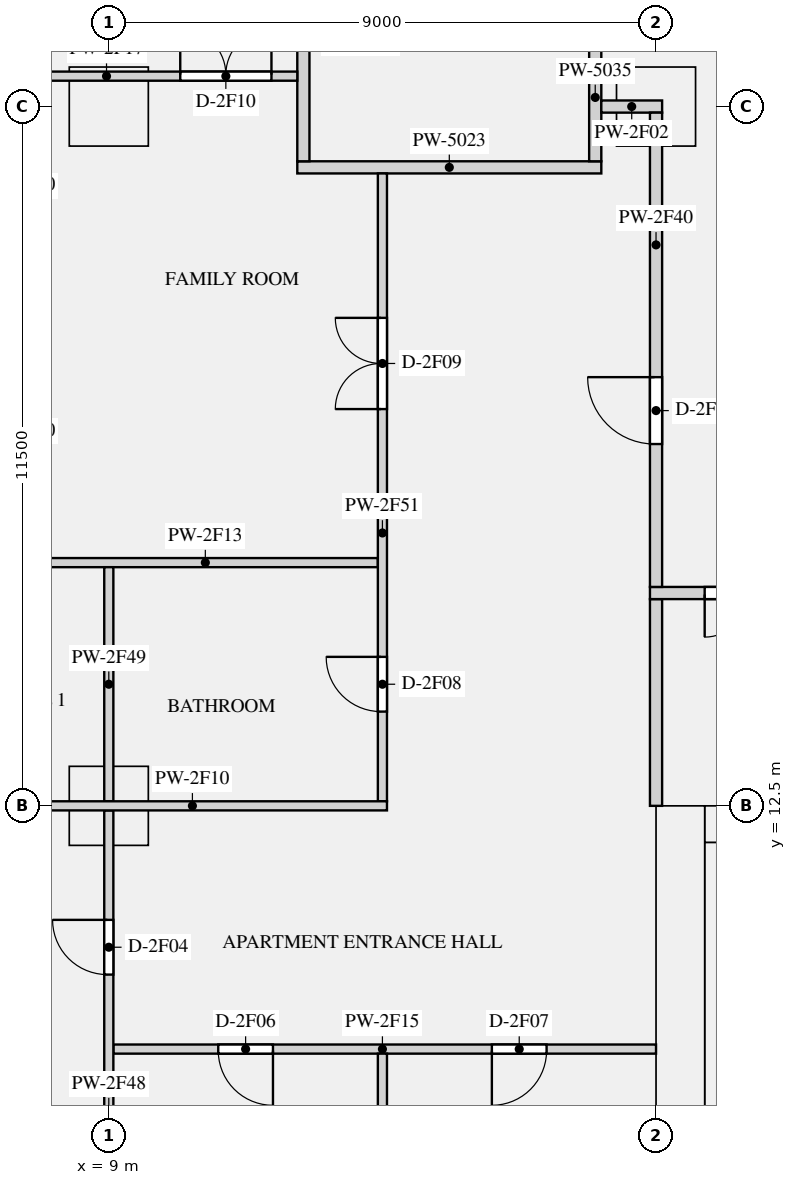
"""IFC4 building model, lengths in metres.
Left out: names, types, materials, properties, quantities, classifications, styles, units other than length and angle.
Written with IfcOpenShell. Run it as: python <this file> out.ifc"""

import sys

from ifc_helpers import new_model, si_unit, direction, frame, frame_2d, origin, origin_2d, place, context, subcontext, project, spatial, rectangle, extrude, element, fill, save


model = new_model("IFC4")
c1 = context("Model", 3, precision=1e-05, world=origin(), true_north=direction((0.0, 1.0)))
c2 = subcontext(c1, "Body", "Model", "MODEL_VIEW")
j1 = project(units=[si_unit("LENGTHUNIT", "METRE"), si_unit("PLANEANGLEUNIT", "RADIAN")], contexts=[c1])
p1 = place(None, origin())
s1 = spatial("IfcSite", under=j1, at=p1, CompositionType="ELEMENT")
p2 = place(p1, origin())
s2 = spatial("IfcBuilding", under=s1, at=p2, CompositionType="ELEMENT")
p3 = place(p2, frame((0.0, 0.0, 127.65)))
s3 = spatial("IfcBuildingStorey", under=s2, at=p3, CompositionType="ELEMENT", Elevation=127.65)
for number, where, z_axis, x_axis in (
    (1, (9.0, 24.0, 0.0), (0.0, 0.0, 1.0), (1.0, 0.0, 0.0)),
    (2, (18.0, 24.0, 0.0), (0.0, 0.0, 1.0), (1.0, 0.0, 0.0)),
    (3, (9.0, 12.5, 0.0), (0.0, 0.0, 1.0), (1.0, 0.0, 0.0)),
):
    element("IfcColumn", number, at=place(p3, frame(where, z_axis=z_axis, x_axis=x_axis)), inside=s3, PredefinedType="COLUMN", context=c2, shape_type="SweptSolid", body=[
        extrude(rectangle(XDim=1.3, YDim=1.3, at=origin_2d()), origin(), (0.0, 0.0, 1.0), 3.15),
    ])
p4 = place(p3, frame((18.4, 0.0, 0.0), z_axis=(0.0, 0.0, 1.0), x_axis=(0.0, 1.0, 0.0)))
e4 = element("IfcWall", 4, at=p4, inside=s3, PredefinedType="SHEAR", context=c2, shape_type="SweptSolid", body=[
    extrude(rectangle(XDim=12.5, YDim=0.8, at=frame_2d((6.25, 0.0))), origin(), (0.0, 0.0, 1.0), 3.15),
])
p5 = place(p3, frame((18.8, 12.2, 0.0), z_axis=(0.0, 0.0, 1.0), x_axis=(1.0, 0.0, 0.0)))
e5 = element("IfcWall", 5, at=p5, inside=s3, PredefinedType="SHEAR", context=c2, shape_type="SweptSolid", body=[
    extrude(rectangle(XDim=34.4, YDim=0.6, at=frame_2d((17.2, 0.0))), origin(), (0.0, 0.0, 1.0), 3.15),
])
p6 = place(p5, frame((24.375, 0.0, 0.0)))
e6 = element("IfcOpeningElement", 6, at=p6, cuts=e5, PredefinedType="OPENING", context=c2, shape_type="SweptSolid", body=[
    extrude(rectangle(XDim=1.1, YDim=2.1, at=frame_2d((0.55, 1.05))), frame((0.0, 0.31, 0.0), z_axis=(0.0, -1.0, 0.0), x_axis=(1.0, 0.0, 0.0)), (0.0, 0.0, 1.0), 0.62),
])
p7 = place(p5, frame((26.625, 0.0, 0.0)))
e7 = element("IfcOpeningElement", 7, at=p7, cuts=e5, PredefinedType="OPENING", context=c2, shape_type="SweptSolid", body=[
    extrude(rectangle(XDim=1.1, YDim=2.1, at=frame_2d((0.55, 1.05))), frame((0.0, 0.31, 0.0), z_axis=(0.0, -1.0, 0.0), x_axis=(1.0, 0.0, 0.0)), (0.0, 0.0, 1.0), 0.62),
])
p8 = place(p5, frame((28.875, 0.0, 0.0)))
e8 = element("IfcOpeningElement", 8, at=p8, cuts=e5, PredefinedType="OPENING", context=c2, shape_type="SweptSolid", body=[
    extrude(rectangle(XDim=1.1, YDim=2.1, at=frame_2d((0.55, 1.05))), frame((0.0, 0.31, 0.0), z_axis=(0.0, -1.0, 0.0), x_axis=(1.0, 0.0, 0.0)), (0.0, 0.0, 1.0), 0.62),
])
p9 = place(p5, frame((4.75, 0.0, 0.0)))
e9 = element("IfcOpeningElement", 9, at=p9, cuts=e5, PredefinedType="OPENING", context=c2, shape_type="SweptSolid", body=[
    extrude(rectangle(XDim=0.9, YDim=2.1, at=frame_2d((0.45, 1.05))), frame((0.0, 0.31, 0.0), z_axis=(0.0, -1.0, 0.0), x_axis=(1.0, 0.0, 0.0)), (0.0, 0.0, 1.0), 0.62),
])
p10 = place(p5, frame((11.75, 0.0, 0.0)))
e10 = element("IfcOpeningElement", 10, at=p10, cuts=e5, PredefinedType="OPENING", context=c2, shape_type="SweptSolid", body=[
    extrude(rectangle(XDim=0.9, YDim=2.1, at=frame_2d((0.45, 1.05))), frame((0.0, 0.31, 0.0), z_axis=(0.0, -1.0, 0.0), x_axis=(1.0, 0.0, 0.0)), (0.0, 0.0, 1.0), 0.62),
])
p11 = place(p5, frame((18.25, 0.0, 0.0)))
e11 = element("IfcOpeningElement", 11, at=p11, cuts=e5, PredefinedType="OPENING", context=c2, shape_type="SweptSolid", body=[
    extrude(rectangle(XDim=0.9, YDim=2.1, at=frame_2d((0.45, 1.05))), frame((0.0, 0.31, 0.0), z_axis=(0.0, -1.0, 0.0), x_axis=(1.0, 0.0, 0.0)), (0.0, 0.0, 1.0), 0.62),
])
p12 = place(p5, frame((1.35, 0.0, 0.0)))
e12 = element("IfcOpeningElement", 12, at=p12, cuts=e5, PredefinedType="OPENING", context=c2, shape_type="SweptSolid", body=[
    extrude(rectangle(XDim=1.2, YDim=2.1, at=frame_2d((0.6, 1.05))), frame((0.0, 0.31, 0.0), z_axis=(0.0, -1.0, 0.0), x_axis=(1.0, 0.0, 0.0)), (0.0, 0.0, 1.0), 0.62),
])
p13 = place(p5, frame((31.85, 0.0, 0.0)))
e13 = element("IfcOpeningElement", 13, at=p13, cuts=e5, PredefinedType="OPENING", context=c2, shape_type="SweptSolid", body=[
    extrude(rectangle(XDim=1.2, YDim=2.1, at=frame_2d((0.6, 1.05))), frame((0.0, 0.31, 0.0), z_axis=(0.0, -1.0, 0.0), x_axis=(1.0, 0.0, 0.0)), (0.0, 0.0, 1.0), 0.62),
])
p14 = place(p3, frame((18.9, 1.0, 0.0), z_axis=(0.0, 0.0, 1.0), x_axis=(0.0, 1.0, 0.0)))
e14 = element("IfcWall", 14, at=p14, inside=s3, PredefinedType="SHEAR", context=c2, shape_type="SweptSolid", body=[
    extrude(rectangle(XDim=10.9, YDim=0.2, at=frame_2d((5.45, 0.0))), origin(), (0.0, 0.0, 1.0), 3.15),
])
p15 = place(p3, frame((12.1, 23.0, 0.0), z_axis=(0.0, 0.0, 1.0), x_axis=(1.0, 0.0, 0.0)))
e15 = element("IfcWall", 15, at=p15, inside=s3, PredefinedType="PARTITIONING", context=c2, shape_type="SweptSolid", body=[
    extrude(rectangle(XDim=5.0, YDim=0.2, at=frame_2d((2.5, 0.0))), origin(), (0.0, 0.0, 1.0), 2.65),
])
p16 = place(p3, frame((18.0, 12.5, 0.0), z_axis=(0.0, 0.0, 1.0), x_axis=(0.0, 1.0, 0.0)))
e16 = element("IfcWall", 16, at=p16, inside=s3, PredefinedType="PARTITIONING", context=c2, shape_type="SweptSolid", body=[
    extrude(rectangle(XDim=3.4, YDim=0.2, at=frame_2d((1.7, 0.0))), origin(), (0.0, 0.0, 1.0), 2.65),
])
p17 = place(p3, frame((12.2, 23.1, 0.0), z_axis=(0.0, 0.0, 1.0), x_axis=(0.0, 1.0, 0.0)))
e17 = element("IfcWall", 17, at=p17, inside=s3, PredefinedType="PARTITIONING", context=c2, shape_type="SweptSolid", body=[
    extrude(rectangle(XDim=3.9, YDim=0.2, at=frame_2d((1.95, 0.0))), origin(), (0.0, 0.0, 1.0), 2.65),
])
p18 = place(p3, frame((17.0, 23.1, 0.0), z_axis=(0.0, 0.0, 1.0), x_axis=(0.0, 1.0, 0.0)))
e18 = element("IfcWall", 18, at=p18, inside=s3, PredefinedType="PARTITIONING", context=c2, shape_type="SweptSolid", body=[
    extrude(rectangle(XDim=3.8, YDim=0.2, at=frame_2d((1.9, 0.0))), origin(), (0.0, 0.0, 1.0), 2.65),
])
p19 = place(p18, frame((2.1, 0.0, 0.0)))
e19 = element("IfcOpeningElement", 19, at=p19, cuts=e18, PredefinedType="OPENING", context=c2, shape_type="SweptSolid", body=[
    extrude(rectangle(XDim=1.2, YDim=2.1, at=frame_2d((0.6, 1.05))), frame((0.0, 0.11, 0.0), z_axis=(0.0, -1.0, 0.0), x_axis=(1.0, 0.0, 0.0)), (0.0, 0.0, 1.0), 0.22),
])
p20 = place(p3, frame((17.1, 24.0, 0.0), z_axis=(0.0, 0.0, 1.0), x_axis=(1.0, 0.0, 0.0)))
e20 = element("IfcWall", 20, at=p20, inside=s3, PredefinedType="PARTITIONING", context=c2, shape_type="SweptSolid", body=[
    extrude(rectangle(XDim=1.0, YDim=0.2, at=frame_2d((0.5, 0.0))), origin(), (0.0, 0.0, 1.0), 2.65),
])
p21 = place(p3, frame((5.25, 12.5, 0.0), z_axis=(0.0, 0.0, 1.0), x_axis=(1.0, 0.0, 0.0)))
e21 = element("IfcWall", 21, at=p21, inside=s3, PredefinedType="PARTITIONING", context=c2, shape_type="SweptSolid", body=[
    extrude(rectangle(XDim=8.325, YDim=0.15, at=frame_2d((4.163, 0.0))), origin(), (0.0, 0.0, 1.0), 2.65),
])
p22 = place(p21, frame((1.025, 0.0, 0.0)))
e22 = element("IfcOpeningElement", 22, at=p22, cuts=e21, PredefinedType="OPENING", context=c2, shape_type="SweptSolid", body=[
    extrude(rectangle(XDim=0.9, YDim=2.1, at=frame_2d((0.45, 1.05))), frame((0.0, 0.085, 0.0), z_axis=(0.0, -1.0, 0.0), x_axis=(1.0, 0.0, 0.0)), (0.0, 0.0, 1.0), 0.17),
])
p23 = place(p3, frame((7.75, 16.5, 0.0), z_axis=(0.0, 0.0, 1.0), x_axis=(1.0, 0.0, 0.0)))
e23 = element("IfcWall", 23, at=p23, inside=s3, PredefinedType="PARTITIONING", context=c2, shape_type="SweptSolid", body=[
    extrude(rectangle(XDim=5.675, YDim=0.15, at=frame_2d((2.837, 0.0))), origin(), (0.0, 0.0, 1.0), 2.65),
])
p24 = place(p3, frame((9.075, 8.5, 0.0), z_axis=(0.0, 0.0, 1.0), x_axis=(1.0, 0.0, 0.0)))
e24 = element("IfcWall", 24, at=p24, inside=s3, PredefinedType="PARTITIONING", context=c2, shape_type="SweptSolid", body=[
    extrude(rectangle(XDim=8.925, YDim=0.15, at=frame_2d((4.462, 0.0))), origin(), (0.0, 0.0, 1.0), 2.65),
])
p25 = place(p24, frame((1.725, 0.0, 0.0)))
e25 = element("IfcOpeningElement", 25, at=p25, cuts=e24, PredefinedType="OPENING", context=c2, shape_type="SweptSolid", body=[
    extrude(rectangle(XDim=0.9, YDim=2.1, at=frame_2d((0.45, 1.05))), frame((0.0, 0.085, 0.0), z_axis=(0.0, -1.0, 0.0), x_axis=(1.0, 0.0, 0.0)), (0.0, 0.0, 1.0), 0.17),
])
p26 = place(p24, frame((6.225, 0.0, 0.0)))
e26 = element("IfcOpeningElement", 26, at=p26, cuts=e24, PredefinedType="OPENING", context=c2, shape_type="SweptSolid", body=[
    extrude(rectangle(XDim=0.9, YDim=2.1, at=frame_2d((0.45, 1.05))), frame((0.0, 0.085, 0.0), z_axis=(0.0, -1.0, 0.0), x_axis=(1.0, 0.0, 0.0)), (0.0, 0.0, 1.0), 0.17),
])
p27 = place(p3, frame((7.75, 24.5, 0.0), z_axis=(0.0, 0.0, 1.0), x_axis=(1.0, 0.0, 0.0)))
e27 = element("IfcWall", 27, at=p27, inside=s3, PredefinedType="PARTITIONING", context=c2, shape_type="SweptSolid", body=[
    extrude(rectangle(XDim=4.35, YDim=0.15, at=frame_2d((2.175, 0.0))), origin(), (0.0, 0.0, 1.0), 2.65),
])
p28 = place(p27, frame((2.425, 0.0, 0.0)))
e28 = element("IfcOpeningElement", 28, at=p28, cuts=e27, PredefinedType="OPENING", context=c2, shape_type="SweptSolid", body=[
    extrude(rectangle(XDim=1.5, YDim=2.1, at=frame_2d((0.75, 1.05))), frame((0.0, 0.085, 0.0), z_axis=(0.0, -1.0, 0.0), x_axis=(1.0, 0.0, 0.0)), (0.0, 0.0, 1.0), 0.17),
])
p29 = place(p3, frame((17.9, 16.0, 0.0), z_axis=(0.0, 0.0, 1.0), x_axis=(1.0, 0.0, 0.0)))
e29 = element("IfcWall", 29, at=p29, inside=s3, PredefinedType="PARTITIONING", context=c2, shape_type="SweptSolid", body=[
    extrude(rectangle(XDim=36.2, YDim=0.2, at=frame_2d((18.1, 0.0))), origin(), (0.0, 0.0, 1.0), 2.65),
])
p30 = place(p29, frame((0.9, 0.0, 0.0)))
e30 = element("IfcOpeningElement", 30, at=p30, cuts=e29, PredefinedType="OPENING", context=c2, shape_type="SweptSolid", body=[
    extrude(rectangle(XDim=1.4, YDim=2.1, at=frame_2d((0.7, 1.05))), frame((0.0, 0.11, 0.0), z_axis=(0.0, -1.0, 0.0), x_axis=(1.0, 0.0, 0.0)), (0.0, 0.0, 1.0), 0.22),
])
p31 = place(p29, frame((33.9, 0.0, 0.0)))
e31 = element("IfcOpeningElement", 31, at=p31, cuts=e29, PredefinedType="OPENING", context=c2, shape_type="SweptSolid", body=[
    extrude(rectangle(XDim=1.4, YDim=2.1, at=frame_2d((0.7, 1.05))), frame((0.0, 0.11, 0.0), z_axis=(0.0, -1.0, 0.0), x_axis=(1.0, 0.0, 0.0)), (0.0, 0.0, 1.0), 0.22),
])
p32 = place(p3, frame((18.0, 16.1, 0.0), z_axis=(0.0, 0.0, 1.0), x_axis=(0.0, 1.0, 0.0)))
e32 = element("IfcWall", 32, at=p32, inside=s3, PredefinedType="PARTITIONING", context=c2, shape_type="SweptSolid", body=[
    extrude(rectangle(XDim=7.8, YDim=0.2, at=frame_2d((3.9, 0.0))), origin(), (0.0, 0.0, 1.0), 2.65),
])
p33 = place(p32, frame((2.35, 0.0, 0.0)))
e33 = element("IfcOpeningElement", 33, at=p33, cuts=e32, PredefinedType="OPENING", context=c2, shape_type="SweptSolid", body=[
    extrude(rectangle(XDim=1.1, YDim=2.1, at=frame_2d((0.55, 1.05))), frame((0.0, 0.11, 0.0), z_axis=(0.0, -1.0, 0.0), x_axis=(1.0, 0.0, 0.0)), (0.0, 0.0, 1.0), 0.22),
])
p34 = place(p3, frame((9.0, 5.25, 0.0), z_axis=(0.0, 0.0, 1.0), x_axis=(0.0, 1.0, 0.0)))
e34 = element("IfcWall", 34, at=p34, inside=s3, PredefinedType="PARTITIONING", context=c2, shape_type="SweptSolid", body=[
    extrude(rectangle(XDim=7.175, YDim=0.15, at=frame_2d((3.587, 0.0))), origin(), (0.0, 0.0, 1.0), 2.65),
])
p35 = place(p34, frame((4.475, 0.0, 0.0)))
e35 = element("IfcOpeningElement", 35, at=p35, cuts=e34, PredefinedType="OPENING", context=c2, shape_type="SweptSolid", body=[
    extrude(rectangle(XDim=0.9, YDim=2.1, at=frame_2d((0.45, 1.05))), frame((0.0, 0.085, 0.0), z_axis=(0.0, -1.0, 0.0), x_axis=(1.0, 0.0, 0.0)), (0.0, 0.0, 1.0), 0.17),
])
p36 = place(p3, frame((9.0, 12.575, 0.0), z_axis=(0.0, 0.0, 1.0), x_axis=(0.0, 1.0, 0.0)))
e36 = element("IfcWall", 36, at=p36, inside=s3, PredefinedType="PARTITIONING", context=c2, shape_type="SweptSolid", body=[
    extrude(rectangle(XDim=3.85, YDim=0.15, at=frame_2d((1.925, 0.0))), origin(), (0.0, 0.0, 1.0), 2.65),
])
p37 = place(p3, frame((13.5, 0.75, 0.0), z_axis=(0.0, 0.0, 1.0), x_axis=(0.0, 1.0, 0.0)))
e37 = element("IfcWall", 37, at=p37, inside=s3, PredefinedType="PARTITIONING", context=c2, shape_type="SweptSolid", body=[
    extrude(rectangle(XDim=7.675, YDim=0.15, at=frame_2d((3.837, 0.0))), origin(), (0.0, 0.0, 1.0), 2.65),
])
p38 = place(p3, frame((13.5, 12.575, 0.0), z_axis=(0.0, 0.0, 1.0), x_axis=(0.0, 1.0, 0.0)))
e38 = element("IfcWall", 38, at=p38, inside=s3, PredefinedType="PARTITIONING", context=c2, shape_type="SweptSolid", body=[
    extrude(rectangle(XDim=10.325, YDim=0.15, at=frame_2d((5.163, 0.0))), origin(), (0.0, 0.0, 1.0), 2.65),
])
p39 = place(p38, frame((1.475, 0.0, 0.0)))
e39 = element("IfcOpeningElement", 39, at=p39, cuts=e38, PredefinedType="OPENING", context=c2, shape_type="SweptSolid", body=[
    extrude(rectangle(XDim=0.9, YDim=2.1, at=frame_2d((0.45, 1.05))), frame((0.0, 0.085, 0.0), z_axis=(0.0, -1.0, 0.0), x_axis=(1.0, 0.0, 0.0)), (0.0, 0.0, 1.0), 0.17),
])
p40 = place(p38, frame((6.45, 0.0, 0.0)))
e40 = element("IfcOpeningElement", 40, at=p40, cuts=e38, PredefinedType="OPENING", context=c2, shape_type="SweptSolid", body=[
    extrude(rectangle(XDim=1.5, YDim=2.1, at=frame_2d((0.75, 1.05))), frame((0.0, 0.085, 0.0), z_axis=(0.0, -1.0, 0.0), x_axis=(1.0, 0.0, 0.0)), (0.0, 0.0, 1.0), 0.17),
])
p41 = place(p30, frame((1.4, 0.0, 0.0), z_axis=(0.0, 0.0, 1.0), x_axis=(-1.0, 0.0, 0.0)))
e41 = element("IfcDoor", 41, at=p41, inside=s3, OperationType="DOUBLE_DOOR_SINGLE_SWING", PredefinedType="DOOR", context=c2, shape_type="SweptSolid", body=[
    extrude(rectangle(XDim=1.4, YDim=2.1, at=frame_2d((0.7, 1.05))), frame((0.0, 0.025, 0.0), z_axis=(0.0, -1.0, 0.0), x_axis=(1.0, 0.0, 0.0)), (0.0, 0.0, 1.0), 0.05),
])
fill(e30, e41)
p42 = place(p33, origin())
e42 = element("IfcDoor", 42, at=p42, inside=s3, OperationType="SINGLE_SWING_RIGHT", PredefinedType="DOOR", context=c2, shape_type="SweptSolid", body=[
    extrude(rectangle(XDim=1.1, YDim=2.1, at=frame_2d((0.55, 1.05))), frame((0.0, 0.025, 0.0), z_axis=(0.0, -1.0, 0.0), x_axis=(1.0, 0.0, 0.0)), (0.0, 0.0, 1.0), 0.05),
])
fill(e33, e42)
p43 = place(p35, origin())
e43 = element("IfcDoor", 43, at=p43, inside=s3, OperationType="SINGLE_SWING_RIGHT", PredefinedType="DOOR", context=c2, shape_type="SweptSolid", body=[
    extrude(rectangle(XDim=0.9, YDim=2.1, at=frame_2d((0.45, 1.05))), frame((0.0, 0.025, 0.0), z_axis=(0.0, -1.0, 0.0), x_axis=(1.0, 0.0, 0.0)), (0.0, 0.0, 1.0), 0.05),
])
fill(e35, e43)
p44 = place(p25, frame((0.9, 0.0, 0.0), z_axis=(0.0, 0.0, 1.0), x_axis=(-1.0, 0.0, 0.0)))
e44 = element("IfcDoor", 44, at=p44, inside=s3, OperationType="SINGLE_SWING_LEFT", PredefinedType="DOOR", context=c2, shape_type="SweptSolid", body=[
    extrude(rectangle(XDim=0.9, YDim=2.1, at=frame_2d((0.45, 1.05))), frame((0.0, 0.025, 0.0), z_axis=(0.0, -1.0, 0.0), x_axis=(1.0, 0.0, 0.0)), (0.0, 0.0, 1.0), 0.05),
])
fill(e25, e44)
p45 = place(p26, frame((0.9, 0.0, 0.0), z_axis=(0.0, 0.0, 1.0), x_axis=(-1.0, 0.0, 0.0)))
e45 = element("IfcDoor", 45, at=p45, inside=s3, OperationType="SINGLE_SWING_RIGHT", PredefinedType="DOOR", context=c2, shape_type="SweptSolid", body=[
    extrude(rectangle(XDim=0.9, YDim=2.1, at=frame_2d((0.45, 1.05))), frame((0.0, 0.025, 0.0), z_axis=(0.0, -1.0, 0.0), x_axis=(1.0, 0.0, 0.0)), (0.0, 0.0, 1.0), 0.05),
])
fill(e26, e45)
p46 = place(p39, origin())
e46 = element("IfcDoor", 46, at=p46, inside=s3, OperationType="SINGLE_SWING_RIGHT", PredefinedType="DOOR", context=c2, shape_type="SweptSolid", body=[
    extrude(rectangle(XDim=0.9, YDim=2.1, at=frame_2d((0.45, 1.05))), frame((0.0, 0.025, 0.0), z_axis=(0.0, -1.0, 0.0), x_axis=(1.0, 0.0, 0.0)), (0.0, 0.0, 1.0), 0.05),
])
fill(e39, e46)
p47 = place(p40, origin())
e47 = element("IfcDoor", 47, at=p47, inside=s3, OperationType="DOUBLE_DOOR_SINGLE_SWING", PredefinedType="DOOR", context=c2, shape_type="SweptSolid", body=[
    extrude(rectangle(XDim=1.5, YDim=2.1, at=frame_2d((0.75, 1.05))), frame((0.0, 0.025, 0.0), z_axis=(0.0, -1.0, 0.0), x_axis=(1.0, 0.0, 0.0)), (0.0, 0.0, 1.0), 0.05),
])
fill(e40, e47)
p48 = place(p28, origin())
e48 = element("IfcDoor", 48, at=p48, inside=s3, OperationType="DOUBLE_DOOR_SINGLE_SWING", PredefinedType="DOOR", context=c2, shape_type="SweptSolid", body=[
    extrude(rectangle(XDim=1.5, YDim=2.1, at=frame_2d((0.75, 1.05))), frame((0.0, 0.025, 0.0), z_axis=(0.0, -1.0, 0.0), x_axis=(1.0, 0.0, 0.0)), (0.0, 0.0, 1.0), 0.05),
])
fill(e28, e48)
save(model, sys.argv[1])
